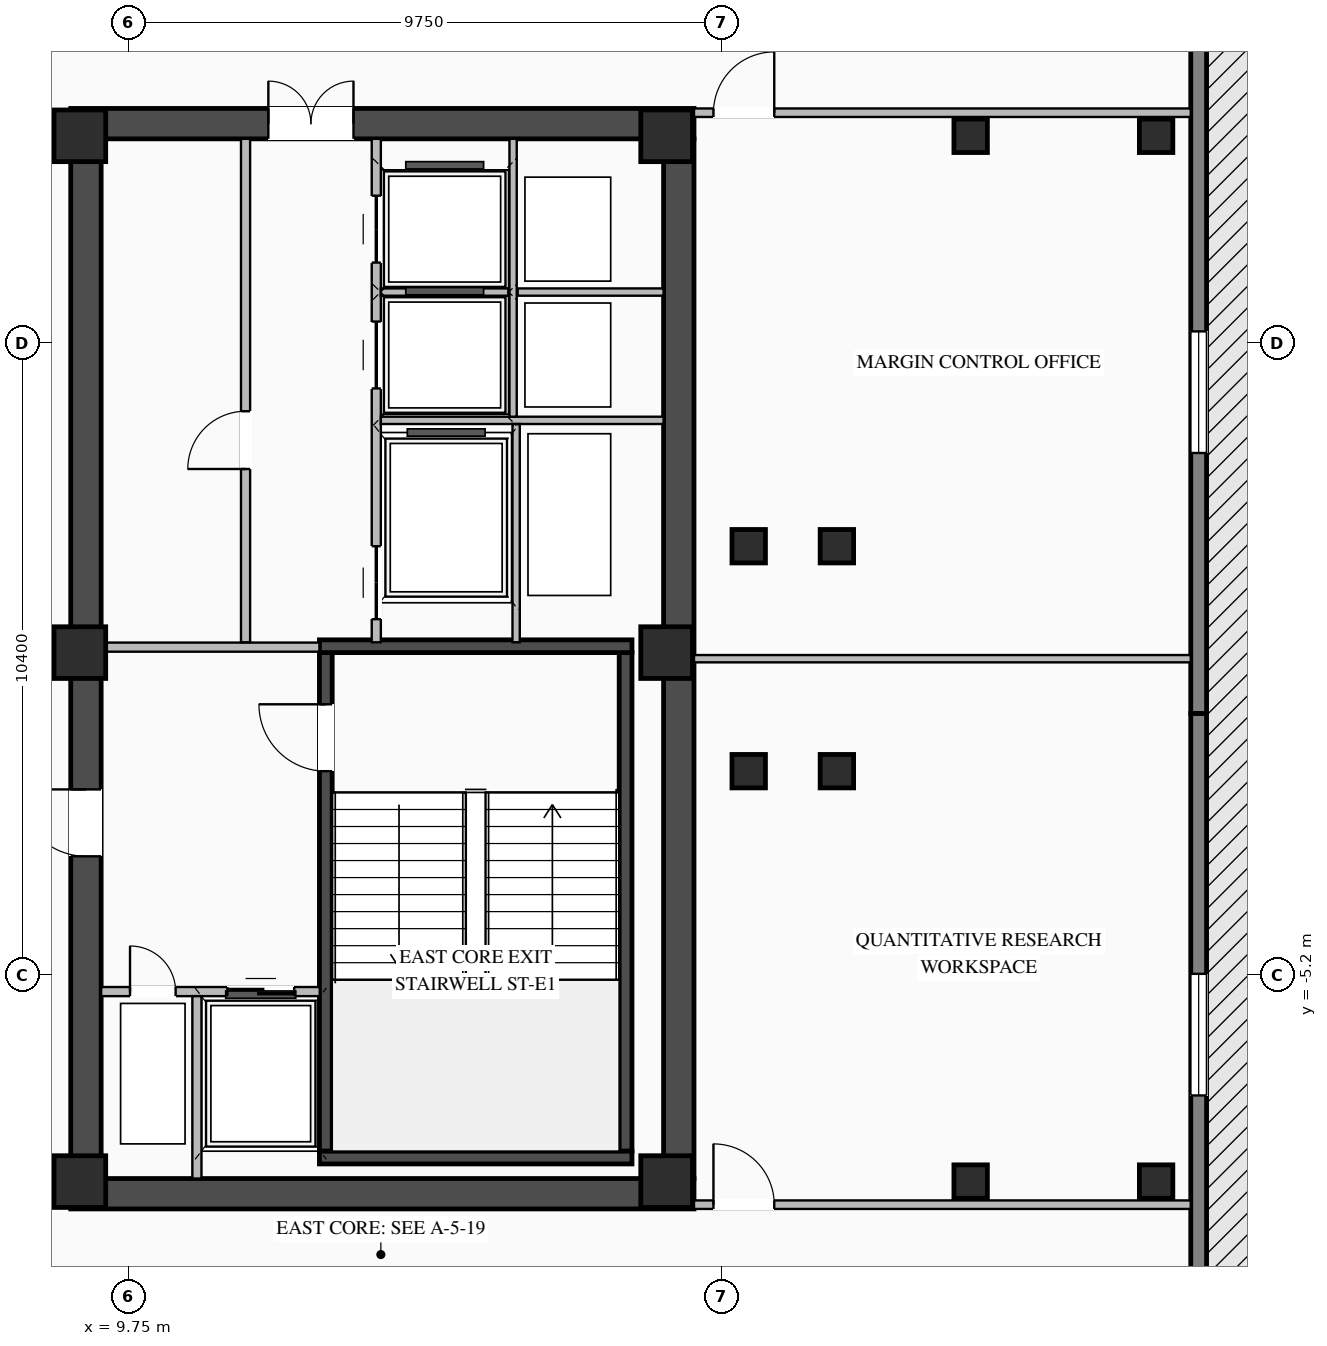
"""IFC4 building model, lengths in metres.
Left out: names, types, materials, properties, quantities, classifications, styles, units other than length and angle.
Written with IfcOpenShell. Run it as: python <this file> out.ifc"""

import sys

from ifc_helpers import new_model, si_unit, direction, frame, frame_2d, origin, origin_2d, place, context, subcontext, project, spatial, rectangle, i_section, extrude, element, fill, save


model = new_model("IFC4")
c1 = context("Model", 3, precision=1e-05, world=origin(), true_north=direction((0.0, 1.0)))
c2 = subcontext(c1, "Body", "Model", "MODEL_VIEW")
j1 = project(units=[si_unit("LENGTHUNIT", "METRE"), si_unit("PLANEANGLEUNIT", "RADIAN")], contexts=[c1])
p1 = place(None, origin())
s1 = spatial("IfcSite", under=j1, at=p1, CompositionType="ELEMENT")
p2 = place(p1, origin())
s2 = spatial("IfcBuilding", under=s1, at=p2, CompositionType="ELEMENT")
p3 = place(p2, frame((0.0, 0.0, 204.3)))
s3 = spatial("IfcBuildingStorey", under=s2, at=p3, CompositionType="ELEMENT", Elevation=204.3)
p4 = place(p3, frame((8.8, -8.8, 0.0), z_axis=(0.0, 0.0, 1.0), x_axis=(1.0, 0.0, 0.0)))
e1 = element("IfcWall", 1, at=p4, inside=s3, PredefinedType="SHEAR", context=c2, shape_type="SweptSolid", body=[
    extrude(rectangle(XDim=10.25, YDim=0.5, at=frame_2d((5.125, 0.0))), origin(), (0.0, 0.0, 1.0), 4.02),
])
p5 = place(p3, frame((8.8, 8.8, 0.0), z_axis=(0.0, 0.0, 1.0), x_axis=(1.0, 0.0, 0.0)))
e2 = element("IfcWall", 2, at=p5, inside=s3, PredefinedType="SHEAR", context=c2, shape_type="SweptSolid", body=[
    extrude(rectangle(XDim=10.25, YDim=0.5, at=frame_2d((5.125, 0.0))), origin(), (0.0, 0.0, 1.0), 4.02),
])
p6 = place(p5, frame((3.25, 0.0, 0.0)))
e3 = element("IfcOpeningElement", 3, at=p6, cuts=e2, PredefinedType="OPENING", context=c2, shape_type="SweptSolid", body=[
    extrude(rectangle(XDim=1.4, YDim=2.05, at=frame_2d((0.7, 1.025))), frame((0.0, 0.26, 0.0), z_axis=(0.0, -1.0, 0.0), x_axis=(1.0, 0.0, 0.0)), (0.0, 0.0, 1.0), 0.52),
])
p7 = place(p3, frame((9.05, -8.55, 0.0), z_axis=(0.0, 0.0, 1.0), x_axis=(0.0, 1.0, 0.0)))
e4 = element("IfcWall", 4, at=p7, inside=s3, PredefinedType="SHEAR", context=c2, shape_type="SweptSolid", body=[
    extrude(rectangle(XDim=17.1, YDim=0.5, at=frame_2d((8.55, 0.0))), origin(), (0.0, 0.0, 1.0), 4.02),
])
p8 = place(p7, frame((5.3, 0.0, 0.0)))
e5 = element("IfcOpeningElement", 5, at=p8, cuts=e4, PredefinedType="OPENING", context=c2, shape_type="SweptSolid", body=[
    extrude(rectangle(XDim=1.1, YDim=2.08, at=frame_2d((0.55, 1.04))), frame((0.0, 0.26, 0.0), z_axis=(0.0, -1.0, 0.0), x_axis=(1.0, 0.0, 0.0)), (0.0, 0.0, 1.0), 0.52),
])
p9 = place(p3, frame((18.8, -8.55, 0.0), z_axis=(0.0, 0.0, 1.0), x_axis=(0.0, 1.0, 0.0)))
e6 = element("IfcWall", 6, at=p9, inside=s3, PredefinedType="SHEAR", context=c2, shape_type="SweptSolid", body=[
    extrude(rectangle(XDim=17.1, YDim=0.5, at=frame_2d((8.55, 0.0))), origin(), (0.0, 0.0, 1.0), 4.02),
])
p10 = place(p3, frame((12.995, -8.1, 0.0), z_axis=(0.0, 0.0, 1.0), x_axis=(0.0, 1.0, 0.0)))
e7 = element("IfcWall", 7, at=p10, inside=s3, PredefinedType="SHEAR", context=c2, shape_type="SweptSolid", body=[
    extrude(rectangle(XDim=8.2, YDim=0.21, at=frame_2d((4.1, 0.0))), origin(), (0.0, 0.0, 1.0), 4.02),
])
p11 = place(p10, frame((6.25, 0.0, 0.0)))
e8 = element("IfcOpeningElement", 8, at=p11, cuts=e7, PredefinedType="OPENING", context=c2, shape_type="SweptSolid", body=[
    extrude(rectangle(XDim=1.1, YDim=2.15, at=frame_2d((0.55, 1.075))), frame((0.0, 0.115, 0.0), z_axis=(0.0, -1.0, 0.0), x_axis=(1.0, 0.0, 0.0)), (0.0, 0.0, 1.0), 0.23),
])
p12 = place(p3, frame((17.925, -8.1, 0.0), z_axis=(0.0, 0.0, 1.0), x_axis=(0.0, 1.0, 0.0)))
e9 = element("IfcWall", 9, at=p12, inside=s3, PredefinedType="SHEAR", context=c2, shape_type="SweptSolid", body=[
    extrude(rectangle(XDim=8.2, YDim=0.21, at=frame_2d((4.1, 0.0))), origin(), (0.0, 0.0, 1.0), 4.02),
])
for number, where, z_axis, x_axis in (
    (10, (12.89, -8.205, 0.0), (0.0, 0.0, 1.0), (1.0, 0.0, 0.0)),
    (11, (18.03, 0.205, 0.0), (0.0, 0.0, 1.0), (-1.0, 0.0, 0.0)),
):
    element("IfcWall", number, at=place(p3, frame(where, z_axis=z_axis, x_axis=x_axis)), inside=s3, PredefinedType="SHEAR", context=c2, shape_type="SweptSolid", body=[
        extrude(rectangle(XDim=5.14, YDim=0.21, at=frame_2d((2.57, 0.0))), origin(), (0.0, 0.0, 1.0), 4.02),
    ])
for number, where, z_axis, x_axis in (
    (12, (8.95, -8.6, 0.0), (0.0, 0.0, 1.0), (1.0, 0.0, 0.0)),
    (13, (8.95, 0.1, 0.0), (0.0, 0.0, 1.0), (1.0, 0.0, 0.0)),
    (14, (8.95, 8.6, 0.0), (0.0, 0.0, 1.0), (1.0, 0.0, 0.0)),
    (15, (18.6, -8.6, 0.0), (0.0, 0.0, 1.0), (1.0, 0.0, 0.0)),
    (16, (18.6, 0.1, 0.0), (0.0, 0.0, 1.0), (1.0, 0.0, 0.0)),
    (17, (18.6, 8.6, 0.0), (0.0, 0.0, 1.0), (1.0, 0.0, 0.0)),
):
    element("IfcColumn", number, at=place(p3, frame(where, z_axis=z_axis, x_axis=x_axis)), inside=s3, PredefinedType="COLUMN", context=c2, shape_type="SweptSolid", body=[
        extrude(rectangle(XDim=0.85, YDim=0.85, at=origin_2d()), origin(), (0.0, 0.0, 1.0), 4.2),
    ])
for number, where, z_axis, x_axis in (
    (18, (19.95, -1.85, 0.0), (0.0, 0.0, 1.0), (1.0, 0.0, 0.0)),
    (19, (19.95, 1.85, 0.0), (0.0, 0.0, 1.0), (1.0, 0.0, 0.0)),
    (20, (21.4, -1.85, 0.0), (0.0, 0.0, 1.0), (1.0, 0.0, 0.0)),
    (21, (21.4, 1.85, 0.0), (0.0, 0.0, 1.0), (1.0, 0.0, 0.0)),
    (22, (23.6, -8.6, 0.0), (0.0, 0.0, 1.0), (1.0, 0.0, 0.0)),
    (23, (23.6, 8.6, 0.0), (0.0, 0.0, 1.0), (1.0, 0.0, 0.0)),
):
    element("IfcColumn", number, at=place(p3, frame(where, z_axis=z_axis, x_axis=x_axis)), inside=s3, PredefinedType="COLUMN", context=c2, shape_type="SweptSolid", body=[
        extrude(i_section(OverallWidth=0.55, OverallDepth=0.55, WebThickness=0.024, FlangeThickness=0.036, at=origin_2d()), origin(), (0.0, 0.0, 1.0), 4.2),
    ])
for number, where, z_axis, x_axis in (
    (24, (26.65, -8.6, -0.28), (0.0, 0.0, 1.0), (1.0, 0.0, 0.0)),
    (25, (26.65, 8.6, -0.28), (0.0, 0.0, 1.0), (1.0, 0.0, 0.0)),
):
    element("IfcColumn", number, at=place(p3, frame(where, z_axis=z_axis, x_axis=x_axis)), inside=s3, PredefinedType="COLUMN", context=c2, shape_type="SweptSolid", body=[
        extrude(i_section(OverallWidth=0.55, OverallDepth=0.55, WebThickness=0.024, FlangeThickness=0.036, at=origin_2d()), origin(), (0.0, 0.0, 1.0), 4.48),
    ])
p13 = place(p3, frame((27.35, -0.9, 0.0), z_axis=(0.0, 0.0, 1.0), x_axis=(0.0, -1.0, 0.0)))
e26 = element("IfcWall", 26, at=p13, inside=s3, PredefinedType="STANDARD", context=c2, shape_type="SweptSolid", body=[
    extrude(rectangle(XDim=15.85, YDim=0.26, at=frame_2d((7.925, 0.0))), origin(), (0.0, 0.0, 1.0), 4.0),
])
p14 = place(p13, frame((4.283, 0.0, 0.76)))
e27 = element("IfcOpeningElement", 27, at=p14, cuts=e26, PredefinedType="OPENING", context=c2, shape_type="SweptSolid", body=[
    extrude(rectangle(XDim=2.0, YDim=2.05, at=frame_2d((1.0, 1.025))), frame((0.0, 0.14, 0.0), z_axis=(0.0, -1.0, 0.0), x_axis=(1.0, 0.0, 0.0)), (0.0, 0.0, 1.0), 0.28),
])
p15 = place(p13, frame((10.617, 0.0, 0.76)))
e28 = element("IfcOpeningElement", 28, at=p15, cuts=e26, PredefinedType="OPENING", context=c2, shape_type="SweptSolid", body=[
    extrude(rectangle(XDim=2.0, YDim=2.05, at=frame_2d((1.0, 1.025))), frame((0.0, 0.14, 0.0), z_axis=(0.0, -1.0, 0.0), x_axis=(1.0, 0.0, 0.0)), (0.0, 0.0, 1.0), 0.28),
])
p16 = place(p3, frame((27.35, 14.95, 0.0), z_axis=(0.0, 0.0, 1.0), x_axis=(0.0, -1.0, 0.0)))
e29 = element("IfcWall", 29, at=p16, inside=s3, PredefinedType="STANDARD", context=c2, shape_type="SweptSolid", body=[
    extrude(rectangle(XDim=15.85, YDim=0.26, at=frame_2d((7.925, 0.0))), origin(), (0.0, 0.0, 1.0), 4.0),
])
p17 = place(p16, frame((9.567, 0.0, 0.76)))
e30 = element("IfcOpeningElement", 30, at=p17, cuts=e29, PredefinedType="OPENING", context=c2, shape_type="SweptSolid", body=[
    extrude(rectangle(XDim=2.0, YDim=2.05, at=frame_2d((1.0, 1.025))), frame((0.0, 0.14, 0.0), z_axis=(0.0, -1.0, 0.0), x_axis=(1.0, 0.0, 0.0)), (0.0, 0.0, 1.0), 0.28),
])
p18 = place(p3, frame((9.3, -5.475, 0.0), z_axis=(0.0, 0.0, 1.0), x_axis=(1.0, 0.0, 0.0)))
e31 = element("IfcWall", 31, at=p18, inside=s3, PredefinedType="STANDARD", context=c2, shape_type="SweptSolid", body=[
    extrude(rectangle(XDim=3.595, YDim=0.15, at=frame_2d((1.797, 0.0))), origin(), (0.0, 0.0, 1.0), 4.0),
])
p19 = place(p18, frame((2.075, 0.0, 0.0)))
e32 = element("IfcOpeningElement", 32, at=p19, cuts=e31, PredefinedType="OPENING", context=c2, shape_type="SweptSolid", body=[
    extrude(rectangle(XDim=1.1, YDim=2.15, at=frame_2d((0.55, 1.075))), frame((0.0, 0.085, 0.0), z_axis=(0.0, -1.0, 0.0), x_axis=(1.0, 0.0, 0.0)), (0.0, 0.0, 1.0), 0.17),
])
p20 = place(p18, frame((0.475, 0.0, 0.0)))
e33 = element("IfcOpeningElement", 33, at=p20, cuts=e31, PredefinedType="OPENING", context=c2, shape_type="SweptSolid", body=[
    extrude(rectangle(XDim=0.75, YDim=2.05, at=frame_2d((0.375, 1.025))), frame((0.0, 0.085, 0.0), z_axis=(0.0, -1.0, 0.0), x_axis=(1.0, 0.0, 0.0)), (0.0, 0.0, 1.0), 0.17),
])
p21 = place(p3, frame((10.875, -8.55, 0.0), z_axis=(0.0, 0.0, 1.0), x_axis=(0.0, 1.0, 0.0)))
e34 = element("IfcWall", 34, at=p21, inside=s3, PredefinedType="STANDARD", context=c2, shape_type="SweptSolid", body=[
    extrude(rectangle(XDim=3.0, YDim=0.15, at=frame_2d((1.5, 0.0))), origin(), (0.0, 0.0, 1.0), 4.0),
])
p22 = place(p3, frame((9.3, 0.19, 0.0), z_axis=(0.0, 0.0, 1.0), x_axis=(1.0, 0.0, 0.0)))
e35 = element("IfcWall", 35, at=p22, inside=s3, PredefinedType="STANDARD", context=c2, shape_type="SweptSolid", body=[
    extrude(rectangle(XDim=3.59, YDim=0.15, at=frame_2d((1.795, 0.0))), origin(), (0.0, 0.0, 1.0), 3.395),
])
p23 = place(p3, frame((11.675, 0.27, 0.0), z_axis=(0.0, 0.0, 1.0), x_axis=(0.0, 1.0, 0.0)))
e36 = element("IfcWall", 36, at=p23, inside=s3, PredefinedType="STANDARD", context=c2, shape_type="SweptSolid", body=[
    extrude(rectangle(XDim=8.28, YDim=0.15, at=frame_2d((4.14, 0.0))), origin(), (0.0, 0.0, 1.0), 4.0),
])
p24 = place(p23, frame((2.85, 0.0, 0.0)))
e37 = element("IfcOpeningElement", 37, at=p24, cuts=e36, PredefinedType="OPENING", context=c2, shape_type="SweptSolid", body=[
    extrude(rectangle(XDim=0.95, YDim=2.05, at=frame_2d((0.475, 1.025))), frame((0.0, 0.085, 0.0), z_axis=(0.0, -1.0, 0.0), x_axis=(1.0, 0.0, 0.0)), (0.0, 0.0, 1.0), 0.17),
])
p25 = place(p3, frame((13.825, 0.27, 0.0), z_axis=(0.0, 0.0, 1.0), x_axis=(0.0, 1.0, 0.0)))
e38 = element("IfcWall", 38, at=p25, inside=s3, PredefinedType="STANDARD", context=c2, shape_type="SweptSolid", body=[
    extrude(rectangle(XDim=8.28, YDim=0.15, at=frame_2d((4.14, 0.0))), origin(), (0.0, 0.0, 1.0), 4.0),
])
p26 = place(p25, frame((4.175, 0.0, 0.0)))
e39 = element("IfcOpeningElement", 39, at=p26, cuts=e38, PredefinedType="OPENING", context=c2, shape_type="SweptSolid", body=[
    extrude(rectangle(XDim=1.1, YDim=2.1, at=frame_2d((0.55, 1.05))), frame((0.0, 0.085, 0.0), z_axis=(0.0, -1.0, 0.0), x_axis=(1.0, 0.0, 0.0)), (0.0, 0.0, 1.0), 0.17),
])
p27 = place(p25, frame((6.245, 0.0, 0.0)))
e40 = element("IfcOpeningElement", 40, at=p27, cuts=e38, PredefinedType="OPENING", context=c2, shape_type="SweptSolid", body=[
    extrude(rectangle(XDim=1.1, YDim=2.1, at=frame_2d((0.55, 1.05))), frame((0.0, 0.085, 0.0), z_axis=(0.0, -1.0, 0.0), x_axis=(1.0, 0.0, 0.0)), (0.0, 0.0, 1.0), 0.17),
])
p28 = place(p25, frame((0.38, 0.0, 0.0)))
e41 = element("IfcOpeningElement", 41, at=p28, cuts=e38, PredefinedType="OPENING", context=c2, shape_type="SweptSolid", body=[
    extrude(rectangle(XDim=1.2, YDim=2.1, at=frame_2d((0.6, 1.05))), frame((0.0, 0.085, 0.0), z_axis=(0.0, -1.0, 0.0), x_axis=(1.0, 0.0, 0.0)), (0.0, 0.0, 1.0), 0.17),
])
p29 = place(p3, frame((13.9, 3.92, 0.0), z_axis=(0.0, 0.0, 1.0), x_axis=(1.0, 0.0, 0.0)))
e42 = element("IfcWall", 42, at=p29, inside=s3, PredefinedType="STANDARD", context=c2, shape_type="SweptSolid", body=[
    extrude(rectangle(XDim=4.65, YDim=0.12, at=frame_2d((2.325, 0.0))), origin(), (0.0, 0.0, 1.0), 4.0),
])
p30 = place(p3, frame((16.15, 6.03, 0.0), z_axis=(0.0, 0.0, 1.0), x_axis=(1.0, 0.0, 0.0)))
e43 = element("IfcWall", 43, at=p30, inside=s3, PredefinedType="STANDARD", context=c2, shape_type="SweptSolid", body=[
    extrude(rectangle(XDim=2.4, YDim=0.12, at=frame_2d((1.2, 0.0))), origin(), (0.0, 0.0, 1.0), 4.0),
])
p31 = place(p3, frame((16.075, 3.98, 0.0), z_axis=(0.0, 0.0, 1.0), x_axis=(0.0, 1.0, 0.0)))
e44 = element("IfcWall", 44, at=p31, inside=s3, PredefinedType="STANDARD", context=c2, shape_type="SweptSolid", body=[
    extrude(rectangle(XDim=4.57, YDim=0.12, at=frame_2d((2.285, 0.0))), origin(), (0.0, 0.0, 1.0), 4.0),
])
p32 = place(p3, frame((13.9, 6.03, 0.0), z_axis=(0.0, 0.0, 1.0), x_axis=(1.0, 0.0, 0.0)))
e45 = element("IfcWall", 45, at=p32, inside=s3, PredefinedType="STANDARD", context=c2, shape_type="SweptSolid", body=[
    extrude(rectangle(XDim=2.1, YDim=0.12, at=frame_2d((1.05, 0.0))), origin(), (0.0, 0.0, 1.0), 4.0),
])
p33 = place(p3, frame((16.125, 0.27, 0.0), z_axis=(0.0, 0.0, 1.0), x_axis=(0.0, 1.0, 0.0)))
e46 = element("IfcWall", 46, at=p33, inside=s3, PredefinedType="STANDARD", context=c2, shape_type="SweptSolid", body=[
    extrude(rectangle(XDim=3.59, YDim=0.12, at=frame_2d((1.795, 0.0))), origin(), (0.0, 0.0, 1.0), 4.0),
])
p34 = place(p3, frame((19.05, 8.98, 0.0), z_axis=(0.0, 0.0, 1.0), x_axis=(1.0, 0.0, 0.0)))
e47 = element("IfcWall", 47, at=p34, inside=s3, PredefinedType="STANDARD", context=c2, shape_type="SweptSolid", body=[
    extrude(rectangle(XDim=8.17, YDim=0.14, at=frame_2d((4.085, 0.0))), origin(), (0.0, 0.0, 1.0), 4.0),
])
p35 = place(p34, frame((0.32, 0.0, 0.0)))
e48 = element("IfcOpeningElement", 48, at=p35, cuts=e47, PredefinedType="OPENING", context=c2, shape_type="SweptSolid", body=[
    extrude(rectangle(XDim=1.0, YDim=2.08, at=frame_2d((0.5, 1.04))), frame((0.0, 0.08, 0.0), z_axis=(0.0, -1.0, 0.0), x_axis=(1.0, 0.0, 0.0)), (0.0, 0.0, 1.0), 0.16),
])
p36 = place(p3, frame((19.05, -8.98, 0.0), z_axis=(0.0, 0.0, 1.0), x_axis=(1.0, 0.0, 0.0)))
e49 = element("IfcWall", 49, at=p36, inside=s3, PredefinedType="STANDARD", context=c2, shape_type="SweptSolid", body=[
    extrude(rectangle(XDim=8.17, YDim=0.14, at=frame_2d((4.085, 0.0))), origin(), (0.0, 0.0, 1.0), 4.0),
])
p37 = place(p36, frame((0.32, 0.0, 0.0)))
e50 = element("IfcOpeningElement", 50, at=p37, cuts=e49, PredefinedType="OPENING", context=c2, shape_type="SweptSolid", body=[
    extrude(rectangle(XDim=1.0, YDim=2.08, at=frame_2d((0.5, 1.04))), frame((0.0, 0.08, 0.0), z_axis=(0.0, -1.0, 0.0), x_axis=(1.0, 0.0, 0.0)), (0.0, 0.0, 1.0), 0.16),
])
p38 = place(p3, frame((19.05, 0.0, 0.0), z_axis=(0.0, 0.0, 1.0), x_axis=(1.0, 0.0, 0.0)))
e51 = element("IfcWall", 51, at=p38, inside=s3, PredefinedType="STANDARD", context=c2, shape_type="SweptSolid", body=[
    extrude(rectangle(XDim=8.17, YDim=0.12, at=frame_2d((4.085, 0.0))), origin(), (0.0, 0.0, 1.0), 3.595),
])
p39 = place(p14, origin())
e52 = element("IfcWindow", 52, at=p39, inside=s3, PartitioningType="DOUBLE_PANEL_VERTICAL", PredefinedType="WINDOW", context=c2, shape_type="SweptSolid", body=[
    extrude(rectangle(XDim=2.0, YDim=2.05, at=frame_2d((1.0, 1.025))), frame((0.0, 0.03, 0.0), z_axis=(0.0, -1.0, 0.0), x_axis=(1.0, 0.0, 0.0)), (0.0, 0.0, 1.0), 0.06),
])
fill(e27, e52)
p40 = place(p17, origin())
e53 = element("IfcWindow", 53, at=p40, inside=s3, PartitioningType="DOUBLE_PANEL_VERTICAL", PredefinedType="WINDOW", context=c2, shape_type="SweptSolid", body=[
    extrude(rectangle(XDim=2.0, YDim=2.05, at=frame_2d((1.0, 1.025))), frame((0.0, 0.03, 0.0), z_axis=(0.0, -1.0, 0.0), x_axis=(1.0, 0.0, 0.0)), (0.0, 0.0, 1.0), 0.06),
])
fill(e30, e53)
p41 = place(p11, origin())
e54 = element("IfcDoor", 54, at=p41, inside=s3, OperationType="SINGLE_SWING_RIGHT", PredefinedType="DOOR", context=c2, shape_type="SweptSolid", body=[
    extrude(rectangle(XDim=1.1, YDim=2.15, at=frame_2d((0.55, 1.075))), frame((0.0, 0.025, 0.0), z_axis=(0.0, -1.0, 0.0), x_axis=(1.0, 0.0, 0.0)), (0.0, 0.0, 1.0), 0.05),
])
fill(e8, e54)
p42 = place(p19, origin())
e55 = element("IfcDoor", 55, at=p42, inside=s3, OperationType="DOUBLE_DOOR_SLIDING", PredefinedType="DOOR", context=c2, shape_type="SweptSolid", body=[
    extrude(rectangle(XDim=1.1, YDim=2.15, at=frame_2d((0.55, 1.075))), frame((0.0, 0.025, 0.0), z_axis=(0.0, -1.0, 0.0), x_axis=(1.0, 0.0, 0.0)), (0.0, 0.0, 1.0), 0.05),
])
fill(e32, e55)
p43 = place(p20, origin())
e56 = element("IfcDoor", 56, at=p43, inside=s3, OperationType="SINGLE_SWING_LEFT", PredefinedType="DOOR", context=c2, shape_type="SweptSolid", body=[
    extrude(rectangle(XDim=0.75, YDim=2.05, at=frame_2d((0.375, 1.025))), frame((0.0, 0.025, 0.0), z_axis=(0.0, -1.0, 0.0), x_axis=(1.0, 0.0, 0.0)), (0.0, 0.0, 1.0), 0.05),
])
fill(e33, e56)
p44 = place(p8, origin())
e57 = element("IfcDoor", 57, at=p44, inside=s3, OperationType="SINGLE_SWING_RIGHT", PredefinedType="DOOR", context=c2, shape_type="SweptSolid", body=[
    extrude(rectangle(XDim=1.1, YDim=2.08, at=frame_2d((0.55, 1.04))), frame((0.0, -0.155, 0.0), z_axis=(0.0, -1.0, 0.0), x_axis=(1.0, 0.0, 0.0)), (0.0, 0.0, 1.0), 0.05),
])
fill(e5, e57)
p45 = place(p6, origin())
e58 = element("IfcDoor", 58, at=p45, inside=s3, OperationType="DOUBLE_DOOR_SINGLE_SWING", PredefinedType="DOOR", context=c2, shape_type="SweptSolid", body=[
    extrude(rectangle(XDim=1.4, YDim=2.05, at=frame_2d((0.7, 1.025))), frame((0.0, 0.195, 0.0), z_axis=(0.0, -1.0, 0.0), x_axis=(1.0, 0.0, 0.0)), (0.0, 0.0, 1.0), 0.05),
])
fill(e3, e58)
p46 = place(p24, origin())
e59 = element("IfcDoor", 59, at=p46, inside=s3, OperationType="SINGLE_SWING_LEFT", PredefinedType="DOOR", context=c2, shape_type="SweptSolid", body=[
    extrude(rectangle(XDim=0.95, YDim=2.05, at=frame_2d((0.475, 1.025))), frame((0.0, 0.025, 0.0), z_axis=(0.0, -1.0, 0.0), x_axis=(1.0, 0.0, 0.0)), (0.0, 0.0, 1.0), 0.05),
])
fill(e37, e59)
p47 = place(p26, origin())
e60 = element("IfcDoor", 60, at=p47, inside=s3, OperationType="DOUBLE_DOOR_SLIDING", PredefinedType="DOOR", context=c2, shape_type="SweptSolid", body=[
    extrude(rectangle(XDim=1.1, YDim=2.1, at=frame_2d((0.55, 1.05))), frame((0.0, 0.025, 0.0), z_axis=(0.0, -1.0, 0.0), x_axis=(1.0, 0.0, 0.0)), (0.0, 0.0, 1.0), 0.05),
])
fill(e39, e60)
p48 = place(p27, origin())
e61 = element("IfcDoor", 61, at=p48, inside=s3, OperationType="DOUBLE_DOOR_SLIDING", PredefinedType="DOOR", context=c2, shape_type="SweptSolid", body=[
    extrude(rectangle(XDim=1.1, YDim=2.1, at=frame_2d((0.55, 1.05))), frame((0.0, 0.025, 0.0), z_axis=(0.0, -1.0, 0.0), x_axis=(1.0, 0.0, 0.0)), (0.0, 0.0, 1.0), 0.05),
])
fill(e40, e61)
p49 = place(p28, origin())
e62 = element("IfcDoor", 62, at=p49, inside=s3, OperationType="DOUBLE_DOOR_SLIDING", PredefinedType="DOOR", context=c2, shape_type="SweptSolid", body=[
    extrude(rectangle(XDim=1.2, YDim=2.1, at=frame_2d((0.6, 1.05))), frame((0.0, 0.025, 0.0), z_axis=(0.0, -1.0, 0.0), x_axis=(1.0, 0.0, 0.0)), (0.0, 0.0, 1.0), 0.05),
])
fill(e41, e62)
p50 = place(p35, origin())
e63 = element("IfcDoor", 63, at=p50, inside=s3, OperationType="SINGLE_SWING_RIGHT", PredefinedType="DOOR", context=c2, shape_type="SweptSolid", body=[
    extrude(rectangle(XDim=1.0, YDim=2.08, at=frame_2d((0.5, 1.04))), frame((0.0, 0.025, 0.0), z_axis=(0.0, -1.0, 0.0), x_axis=(1.0, 0.0, 0.0)), (0.0, 0.0, 1.0), 0.05),
])
fill(e48, e63)
p51 = place(p37, origin())
e64 = element("IfcDoor", 64, at=p51, inside=s3, OperationType="SINGLE_SWING_LEFT", PredefinedType="DOOR", context=c2, shape_type="SweptSolid", body=[
    extrude(rectangle(XDim=1.0, YDim=2.08, at=frame_2d((0.5, 1.04))), frame((0.0, 0.025, 0.0), z_axis=(0.0, -1.0, 0.0), x_axis=(1.0, 0.0, 0.0)), (0.0, 0.0, 1.0), 0.05),
])
fill(e50, e64)
save(model, sys.argv[1])
